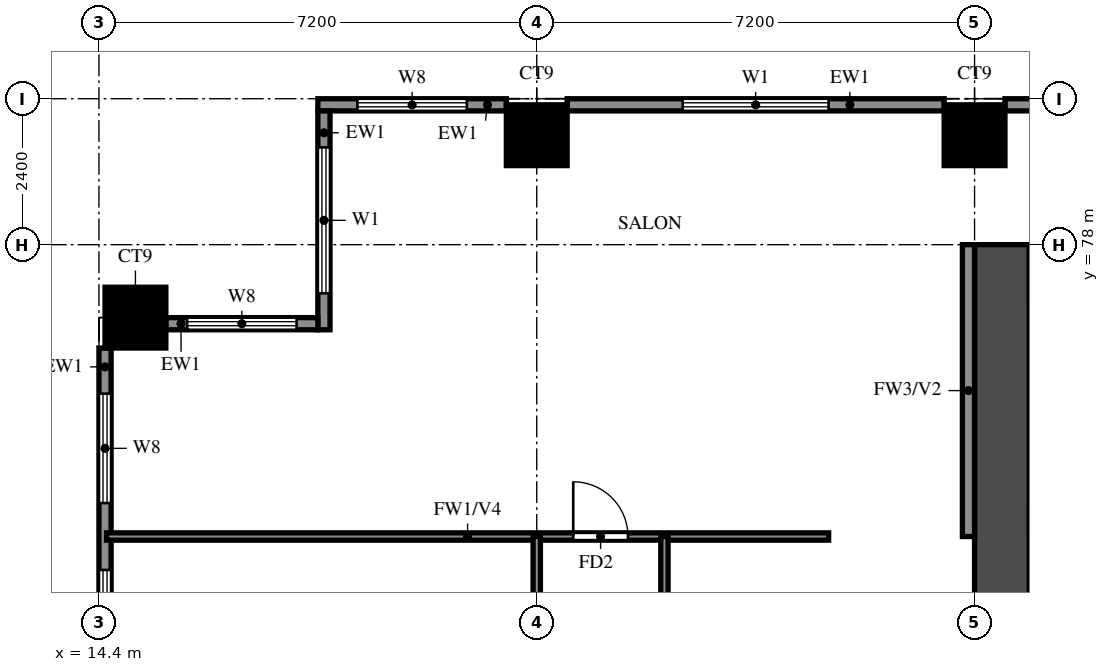
"""IFC4 building model, lengths in metres.
Left out: names, types, materials, properties, quantities, classifications, styles, units other than length and angle.
Written with IfcOpenShell. Run it as: python <this file> out.ifc"""

import sys

from ifc_helpers import new_model, si_unit, direction, frame, frame_2d, origin, origin_2d, place, context, subcontext, project, spatial, rectangle, extrude, source, transform, mapped, element, fill, save


model = new_model("IFC4")
c1 = context("Model", 3, precision=1e-05, world=origin(), true_north=direction((0.0, 1.0)))
c2 = subcontext(c1, "Body", "Model", "MODEL_VIEW")
j1 = project(units=[si_unit("LENGTHUNIT", "METRE"), si_unit("PLANEANGLEUNIT", "RADIAN")], contexts=[c1])
p1 = place(None, origin())
s1 = spatial("IfcSite", under=j1, at=p1, CompositionType="ELEMENT")
p2 = place(p1, origin())
s2 = spatial("IfcBuilding", under=s1, at=p2, CompositionType="ELEMENT")
p3 = place(p2, frame((0.0, 0.0, 62.0)))
s3 = spatial("IfcBuildingStorey", under=s2, at=p3, CompositionType="ELEMENT", Elevation=62.0)
m1 = source(origin(), c2, "Body", "SweptSolid", [
    extrude(rectangle(XDim=1.0, YDim=1.0, at=origin_2d()), origin(), (0.0, 0.0, 1.0), 3.18),
])
for number, where, z_axis, x_axis in (
    (1, (15.0, 76.8, 0.0), (0.0, 0.0, 1.0), (1.0, 0.0, 0.0)),
    (2, (21.6, 79.8, 0.0), (0.0, 0.0, 1.0), (1.0, 0.0, 0.0)),
    (3, (28.8, 79.8, 0.0), (0.0, 0.0, 1.0), (1.0, 0.0, 0.0)),
):
    element("IfcColumn", number, at=place(p3, frame(where, z_axis=z_axis, x_axis=x_axis)), inside=s3, PredefinedType="COLUMN", context=c2, shape_type="MappedRepresentation", body=[
        mapped(m1, transform((0.0, 0.0, 0.0))),
    ])
p4 = place(p3, frame((29.25, 66.0, 0.0), z_axis=(0.0, 0.0, 1.0), x_axis=(0.0, 1.0, 0.0)))
e4 = element("IfcWall", 4, at=p4, inside=s3, PredefinedType="SHEAR", context=c2, shape_type="SweptSolid", body=[
    extrude(rectangle(XDim=12.0, YDim=0.9, at=frame_2d((6.0, 0.0))), origin(), (0.0, 0.0, 1.0), 3.18),
])
p5 = place(p3, frame((29.7, 73.475, 0.0), z_axis=(0.0, 0.0, 1.0), x_axis=(1.0, 0.0, 0.0)))
e5 = element("IfcWall", 5, at=p5, inside=s3, PredefinedType="SHEAR", context=c2, shape_type="SweptSolid", body=[
    extrude(rectangle(XDim=3.175, YDim=0.45, at=frame_2d((1.587, 0.0))), origin(), (0.0, 0.0, 1.0), 3.18),
])
p6 = place(p3, frame((35.5, 80.3, 0.0), z_axis=(0.0, 0.0, 1.0), x_axis=(-1.0, 0.0, 0.0)))
e6 = element("IfcWall", 6, at=p6, inside=s3, PredefinedType="SOLIDWALL", context=c2, shape_type="SweptSolid", body=[
    extrude(rectangle(XDim=6.2, YDim=0.2, at=frame_2d((3.1, 0.0))), origin(), (0.0, 0.0, 1.0), 3.18),
])
p7 = place(p3, frame((28.3, 80.3, 0.0), z_axis=(0.0, 0.0, 1.0), x_axis=(-1.0, 0.0, 0.0)))
e7 = element("IfcWall", 7, at=p7, inside=s3, PredefinedType="SOLIDWALL", context=c2, shape_type="SweptSolid", body=[
    extrude(rectangle(XDim=6.2, YDim=0.2, at=frame_2d((3.1, 0.0))), origin(), (0.0, 0.0, 1.0), 3.18),
])
p8 = place(p7, frame((1.9, 0.0, 0.6)))
e8 = element("IfcOpeningElement", 8, at=p8, cuts=e7, PredefinedType="OPENING", context=c2, shape_type="SweptSolid", body=[
    extrude(rectangle(XDim=2.4, YDim=2.4, at=frame_2d((1.2, 1.2))), frame((0.0, 0.11, 0.0), z_axis=(0.0, -1.0, 0.0), x_axis=(1.0, 0.0, 0.0)), (0.0, 0.0, 1.0), 0.22),
])
p9 = place(p3, frame((21.1, 80.3, 0.0), z_axis=(0.0, 0.0, 1.0), x_axis=(-1.0, 0.0, 0.0)))
e9 = element("IfcWall", 9, at=p9, inside=s3, PredefinedType="SOLIDWALL", context=c2, shape_type="SweptSolid", body=[
    extrude(rectangle(XDim=3.1, YDim=0.2, at=frame_2d((1.55, 0.0))), origin(), (0.0, 0.0, 1.0), 3.18),
])
p10 = place(p9, frame((0.65, 0.0, 0.6)))
e10 = element("IfcOpeningElement", 10, at=p10, cuts=e9, PredefinedType="OPENING", context=c2, shape_type="SweptSolid", body=[
    extrude(rectangle(XDim=1.8, YDim=2.4, at=frame_2d((0.9, 1.2))), frame((0.0, 0.11, 0.0), z_axis=(0.0, -1.0, 0.0), x_axis=(1.0, 0.0, 0.0)), (0.0, 0.0, 1.0), 0.22),
])
p11 = place(p3, frame((18.1, 80.2, 0.0), z_axis=(0.0, 0.0, 1.0), x_axis=(0.0, -1.0, 0.0)))
e11 = element("IfcWall", 11, at=p11, inside=s3, PredefinedType="SOLIDWALL", context=c2, shape_type="SweptSolid", body=[
    extrude(rectangle(XDim=3.6, YDim=0.2, at=frame_2d((1.8, 0.0))), origin(), (0.0, 0.0, 1.0), 3.18),
])
p12 = place(p11, frame((0.6, 0.0, 0.6)))
e12 = element("IfcOpeningElement", 12, at=p12, cuts=e11, PredefinedType="OPENING", context=c2, shape_type="SweptSolid", body=[
    extrude(rectangle(XDim=2.4, YDim=2.4, at=frame_2d((1.2, 1.2))), frame((0.0, 0.11, 0.0), z_axis=(0.0, -1.0, 0.0), x_axis=(1.0, 0.0, 0.0)), (0.0, 0.0, 1.0), 0.22),
])
p13 = place(p3, frame((18.0, 76.7, 0.0), z_axis=(0.0, 0.0, 1.0), x_axis=(-1.0, 0.0, 0.0)))
e13 = element("IfcWall", 13, at=p13, inside=s3, PredefinedType="SOLIDWALL", context=c2, shape_type="SweptSolid", body=[
    extrude(rectangle(XDim=2.5, YDim=0.2, at=frame_2d((1.25, 0.0))), origin(), (0.0, 0.0, 1.0), 3.18),
])
p14 = place(p13, frame((0.35, 0.0, 0.6)))
e14 = element("IfcOpeningElement", 14, at=p14, cuts=e13, PredefinedType="OPENING", context=c2, shape_type="SweptSolid", body=[
    extrude(rectangle(XDim=1.8, YDim=2.4, at=frame_2d((0.9, 1.2))), frame((0.0, 0.11, 0.0), z_axis=(0.0, -1.0, 0.0), x_axis=(1.0, 0.0, 0.0)), (0.0, 0.0, 1.0), 0.22),
])
p15 = place(p3, frame((14.5, 76.3, 0.0), z_axis=(0.0, 0.0, 1.0), x_axis=(0.0, -1.0, 0.0)))
e15 = element("IfcWall", 15, at=p15, inside=s3, PredefinedType="SOLIDWALL", context=c2, shape_type="SweptSolid", body=[
    extrude(rectangle(XDim=6.2, YDim=0.2, at=frame_2d((3.1, 0.0))), origin(), (0.0, 0.0, 1.0), 3.18),
])
p16 = place(p15, frame((3.65, 0.0, 0.6)))
e16 = element("IfcOpeningElement", 16, at=p16, cuts=e15, PredefinedType="OPENING", context=c2, shape_type="SweptSolid", body=[
    extrude(rectangle(XDim=1.8, YDim=2.4, at=frame_2d((0.9, 1.2))), frame((0.0, 0.11, 0.0), z_axis=(0.0, -1.0, 0.0), x_axis=(1.0, 0.0, 0.0)), (0.0, 0.0, 1.0), 0.22),
])
p17 = place(p15, frame((0.75, 0.0, 0.6)))
e17 = element("IfcOpeningElement", 17, at=p17, cuts=e15, PredefinedType="OPENING", context=c2, shape_type="SweptSolid", body=[
    extrude(rectangle(XDim=1.8, YDim=2.4, at=frame_2d((0.9, 1.2))), frame((0.0, 0.11, 0.0), z_axis=(0.0, -1.0, 0.0), x_axis=(1.0, 0.0, 0.0)), (0.0, 0.0, 1.0), 0.22),
])
p18 = place(p3, frame((28.7, 73.2, 0.0), z_axis=(0.0, 0.0, 1.0), x_axis=(0.0, 1.0, 0.0)))
e18 = element("IfcWall", 18, at=p18, inside=s3, PredefinedType="SOLIDWALL", context=c2, shape_type="SweptSolid", body=[
    extrude(rectangle(XDim=4.8, YDim=0.2, at=frame_2d((2.4, 0.0))), origin(), (0.0, 0.0, 1.0), 3.18),
])
p19 = place(p3, frame((14.525, 73.2, 0.0), z_axis=(0.0, 0.0, 1.0), x_axis=(1.0, 0.0, 0.0)))
e19 = element("IfcWall", 19, at=p19, inside=s3, PredefinedType="PARTITIONING", context=c2, shape_type="SweptSolid", body=[
    extrude(rectangle(XDim=11.875, YDim=0.12, at=frame_2d((5.938, 0.0))), origin(), (0.0, 0.0, 1.0), 2.28),
])
p20 = place(p19, frame((7.675, 0.0, 0.0)))
e20 = element("IfcOpeningElement", 20, at=p20, cuts=e19, PredefinedType="OPENING", context=c2, shape_type="SweptSolid", body=[
    extrude(rectangle(XDim=0.9, YDim=2.1, at=frame_2d((0.45, 1.05))), frame((0.0, 0.07, 0.0), z_axis=(0.0, -1.0, 0.0), x_axis=(1.0, 0.0, 0.0)), (0.0, 0.0, 1.0), 0.14),
])
p21 = place(p3, frame((21.6, 33.725, 0.0), z_axis=(0.0, 0.0, 1.0), x_axis=(0.0, 1.0, 0.0)))
e21 = element("IfcWall", 21, at=p21, inside=s3, PredefinedType="PARTITIONING", context=c2, shape_type="SweptSolid", body=[
    extrude(rectangle(XDim=39.475, YDim=0.12, at=frame_2d((19.737, 0.0))), origin(), (0.0, 0.0, 1.0), 3.18),
])
p22 = place(p21, frame((7.775, 0.0, 0.0)))
e22 = element("IfcOpeningElement", 22, at=p22, cuts=e21, PredefinedType="OPENING", context=c2, shape_type="SweptSolid", body=[
    extrude(rectangle(XDim=0.9, YDim=2.1, at=frame_2d((0.45, 1.05))), frame((0.0, 0.07, 0.0), z_axis=(0.0, -1.0, 0.0), x_axis=(1.0, 0.0, 0.0)), (0.0, 0.0, 1.0), 0.14),
])
p23 = place(p21, frame((15.625, 0.0, 0.0)))
e23 = element("IfcOpeningElement", 23, at=p23, cuts=e21, PredefinedType="OPENING", context=c2, shape_type="SweptSolid", body=[
    extrude(rectangle(XDim=0.9, YDim=2.1, at=frame_2d((0.45, 1.05))), frame((0.0, 0.07, 0.0), z_axis=(0.0, -1.0, 0.0), x_axis=(1.0, 0.0, 0.0)), (0.0, 0.0, 1.0), 0.14),
])
p24 = place(p21, frame((19.225, 0.0, 0.0)))
e24 = element("IfcOpeningElement", 24, at=p24, cuts=e21, PredefinedType="OPENING", context=c2, shape_type="SweptSolid", body=[
    extrude(rectangle(XDim=0.9, YDim=2.1, at=frame_2d((0.45, 1.05))), frame((0.0, 0.07, 0.0), z_axis=(0.0, -1.0, 0.0), x_axis=(1.0, 0.0, 0.0)), (0.0, 0.0, 1.0), 0.14),
])
p25 = place(p21, frame((24.325, 0.0, 0.0)))
e25 = element("IfcOpeningElement", 25, at=p25, cuts=e21, PredefinedType="OPENING", context=c2, shape_type="SweptSolid", body=[
    extrude(rectangle(XDim=1.5, YDim=2.1, at=frame_2d((0.75, 1.05))), frame((0.0, 0.07, 0.0), z_axis=(0.0, -1.0, 0.0), x_axis=(1.0, 0.0, 0.0)), (0.0, 0.0, 1.0), 0.14),
])
p26 = place(p21, frame((30.025, 0.0, 0.0)))
e26 = element("IfcOpeningElement", 26, at=p26, cuts=e21, PredefinedType="OPENING", context=c2, shape_type="SweptSolid", body=[
    extrude(rectangle(XDim=0.9, YDim=2.1, at=frame_2d((0.45, 1.05))), frame((0.0, 0.07, 0.0), z_axis=(0.0, -1.0, 0.0), x_axis=(1.0, 0.0, 0.0)), (0.0, 0.0, 1.0), 0.14),
])
p27 = place(p21, frame((33.625, 0.0, 0.0)))
e27 = element("IfcOpeningElement", 27, at=p27, cuts=e21, PredefinedType="OPENING", context=c2, shape_type="SweptSolid", body=[
    extrude(rectangle(XDim=0.9, YDim=2.1, at=frame_2d((0.45, 1.05))), frame((0.0, 0.07, 0.0), z_axis=(0.0, -1.0, 0.0), x_axis=(1.0, 0.0, 0.0)), (0.0, 0.0, 1.0), 0.14),
])
p28 = place(p21, frame((37.225, 0.0, 0.0)))
e28 = element("IfcOpeningElement", 28, at=p28, cuts=e21, PredefinedType="OPENING", context=c2, shape_type="SweptSolid", body=[
    extrude(rectangle(XDim=0.9, YDim=2.1, at=frame_2d((0.45, 1.05))), frame((0.0, 0.07, 0.0), z_axis=(0.0, -1.0, 0.0), x_axis=(1.0, 0.0, 0.0)), (0.0, 0.0, 1.0), 0.14),
])
p29 = place(p3, frame((23.7, 64.8, 0.0), z_axis=(0.0, 0.0, 1.0), x_axis=(0.0, 1.0, 0.0)))
e29 = element("IfcWall", 29, at=p29, inside=s3, PredefinedType="PARTITIONING", context=c2, shape_type="SweptSolid", body=[
    extrude(rectangle(XDim=8.4, YDim=0.12, at=frame_2d((4.2, 0.0))), origin(), (0.0, 0.0, 1.0), 3.18),
])
p30 = place(p29, frame((4.925, 0.0, 0.0)))
e30 = element("IfcOpeningElement", 30, at=p30, cuts=e29, PredefinedType="OPENING", context=c2, shape_type="SweptSolid", body=[
    extrude(rectangle(XDim=0.9, YDim=2.1, at=frame_2d((0.45, 1.05))), frame((0.0, 0.07, 0.0), z_axis=(0.0, -1.0, 0.0), x_axis=(1.0, 0.0, 0.0)), (0.0, 0.0, 1.0), 0.14),
])
p31 = place(p8, origin())
e31 = element("IfcWindow", 31, at=p31, inside=s3, PartitioningType="DOUBLE_PANEL_VERTICAL", PredefinedType="WINDOW", context=c2, shape_type="SweptSolid", body=[
    extrude(rectangle(XDim=2.4, YDim=2.4, at=frame_2d((1.2, 1.2))), frame((0.0, 0.03, 0.0), z_axis=(0.0, -1.0, 0.0), x_axis=(1.0, 0.0, 0.0)), (0.0, 0.0, 1.0), 0.06),
])
fill(e8, e31)
p32 = place(p10, origin())
e32 = element("IfcWindow", 32, at=p32, inside=s3, PartitioningType="DOUBLE_PANEL_VERTICAL", PredefinedType="WINDOW", context=c2, shape_type="SweptSolid", body=[
    extrude(rectangle(XDim=1.8, YDim=2.4, at=frame_2d((0.9, 1.2))), frame((0.0, 0.03, 0.0), z_axis=(0.0, -1.0, 0.0), x_axis=(1.0, 0.0, 0.0)), (0.0, 0.0, 1.0), 0.06),
])
fill(e10, e32)
p33 = place(p12, origin())
e33 = element("IfcWindow", 33, at=p33, inside=s3, PartitioningType="DOUBLE_PANEL_VERTICAL", PredefinedType="WINDOW", context=c2, shape_type="SweptSolid", body=[
    extrude(rectangle(XDim=2.4, YDim=2.4, at=frame_2d((1.2, 1.2))), frame((0.0, 0.03, 0.0), z_axis=(0.0, -1.0, 0.0), x_axis=(1.0, 0.0, 0.0)), (0.0, 0.0, 1.0), 0.06),
])
fill(e12, e33)
p34 = place(p14, origin())
e34 = element("IfcWindow", 34, at=p34, inside=s3, PartitioningType="DOUBLE_PANEL_VERTICAL", PredefinedType="WINDOW", context=c2, shape_type="SweptSolid", body=[
    extrude(rectangle(XDim=1.8, YDim=2.4, at=frame_2d((0.9, 1.2))), frame((0.0, 0.03, 0.0), z_axis=(0.0, -1.0, 0.0), x_axis=(1.0, 0.0, 0.0)), (0.0, 0.0, 1.0), 0.06),
])
fill(e14, e34)
p35 = place(p16, origin())
e35 = element("IfcWindow", 35, at=p35, inside=s3, PartitioningType="DOUBLE_PANEL_VERTICAL", PredefinedType="WINDOW", context=c2, shape_type="SweptSolid", body=[
    extrude(rectangle(XDim=1.8, YDim=2.4, at=frame_2d((0.9, 1.2))), frame((0.0, 0.03, 0.0), z_axis=(0.0, -1.0, 0.0), x_axis=(1.0, 0.0, 0.0)), (0.0, 0.0, 1.0), 0.06),
])
fill(e16, e35)
p36 = place(p17, origin())
e36 = element("IfcWindow", 36, at=p36, inside=s3, PartitioningType="DOUBLE_PANEL_VERTICAL", PredefinedType="WINDOW", context=c2, shape_type="SweptSolid", body=[
    extrude(rectangle(XDim=1.8, YDim=2.4, at=frame_2d((0.9, 1.2))), frame((0.0, 0.03, 0.0), z_axis=(0.0, -1.0, 0.0), x_axis=(1.0, 0.0, 0.0)), (0.0, 0.0, 1.0), 0.06),
])
fill(e17, e36)
p37 = place(p20, origin())
e37 = element("IfcDoor", 37, at=p37, inside=s3, OperationType="SINGLE_SWING_RIGHT", PredefinedType="DOOR", context=c2, shape_type="SweptSolid", body=[
    extrude(rectangle(XDim=0.9, YDim=2.1, at=frame_2d((0.45, 1.05))), frame((0.0, 0.025, 0.0), z_axis=(0.0, -1.0, 0.0), x_axis=(1.0, 0.0, 0.0)), (0.0, 0.0, 1.0), 0.05),
])
fill(e20, e37)
save(model, sys.argv[1])
